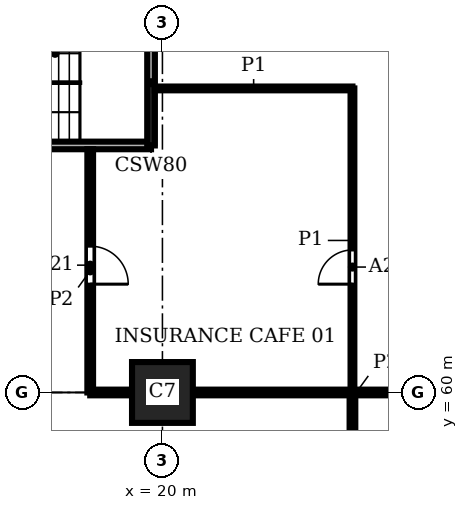
"""IFC4 building model, lengths in metres.
Left out: names, types, materials, properties, quantities, classifications, styles, units other than length and angle.
Written with IfcOpenShell. Run it as: python <this file> out.ifc"""

import sys

from ifc_helpers import new_model, si_unit, direction, frame, frame_2d, origin, origin_2d, place, context, subcontext, project, spatial, rectangle, extrude, element, fill, save


model = new_model("IFC4")
c1 = context("Model", 3, precision=1e-05, world=origin(), true_north=direction((0.0, 1.0)))
c2 = subcontext(c1, "Body", "Model", "MODEL_VIEW")
j1 = project(units=[si_unit("LENGTHUNIT", "METRE"), si_unit("PLANEANGLEUNIT", "RADIAN")], contexts=[c1])
p1 = place(None, origin())
s1 = spatial("IfcSite", under=j1, at=p1, CompositionType="ELEMENT")
p2 = place(p1, origin())
s2 = spatial("IfcBuilding", under=s1, at=p2, CompositionType="ELEMENT")
p3 = place(p2, frame((0.0, 0.0, 23.7)))
s3 = spatial("IfcBuildingStorey", under=s2, at=p3, CompositionType="ELEMENT", Elevation=23.7)
p4 = place(p3, frame((20.0, 60.0, 0.0), z_axis=(0.0, 0.0, 1.0), x_axis=(1.0, 0.0, 0.0)))
e1 = element("IfcColumn", 1, at=p4, inside=s3, PredefinedType="COLUMN", context=c2, shape_type="SweptSolid", body=[
    extrude(rectangle(XDim=1.6, YDim=1.6, at=origin_2d()), origin(), (0.0, 0.0, 1.0), 3.9),
])
p5 = place(p3, frame((13.1, 66.5, 0.0), z_axis=(0.0, 0.0, 1.0), x_axis=(1.0, 0.0, 0.0)))
e2 = element("IfcWall", 2, at=p5, inside=s3, PredefinedType="SHEAR", context=c2, shape_type="SweptSolid", body=[
    extrude(rectangle(XDim=6.6, YDim=0.2, at=frame_2d((3.3, 0.0))), origin(), (0.0, 0.0, 1.0), 3.58),
])
p6 = place(p5, frame((0.375, 0.0, 0.0)))
e3 = element("IfcOpeningElement", 3, at=p6, cuts=e2, PredefinedType="OPENING", context=c2, shape_type="SweptSolid", body=[
    extrude(rectangle(XDim=1.0, YDim=2.1, at=frame_2d((0.5, 1.05))), frame((0.0, 0.11, 0.0), z_axis=(0.0, -1.0, 0.0), x_axis=(1.0, 0.0, 0.0)), (0.0, 0.0, 1.0), 0.22),
])
p7 = place(p3, frame((19.7, 66.5, 0.0), z_axis=(0.0, 0.0, 1.0), x_axis=(0.0, 1.0, 0.0)))
e4 = element("IfcWall", 4, at=p7, inside=s3, PredefinedType="SHEAR", context=c2, shape_type="SweptSolid", body=[
    extrude(rectangle(XDim=3.3, YDim=0.2, at=frame_2d((1.65, 0.0))), origin(), (0.0, 0.0, 1.0), 3.58),
])
p8 = place(p3, frame((25.0, 60.0, 0.0), z_axis=(0.0, 0.0, 1.0), x_axis=(0.0, 1.0, 0.0)))
e5 = element("IfcWall", 5, at=p8, inside=s3, PredefinedType="PARTITIONING", context=c2, shape_type="SweptSolid", body=[
    extrude(rectangle(XDim=8.0, YDim=0.1, at=frame_2d((4.0, 0.0))), origin(), (0.0, 0.0, 1.0), 3.58),
])
p9 = place(p8, frame((2.85, 0.0, 0.0)))
e6 = element("IfcOpeningElement", 6, at=p9, cuts=e5, PredefinedType="OPENING", context=c2, shape_type="SweptSolid", body=[
    extrude(rectangle(XDim=0.9, YDim=2.1, at=frame_2d((0.45, 1.05))), frame((0.0, 0.06, 0.0), z_axis=(0.0, -1.0, 0.0), x_axis=(1.0, 0.0, 0.0)), (0.0, 0.0, 1.0), 0.12),
])
p10 = place(p3, frame((19.8, 68.0, 0.0), z_axis=(0.0, 0.0, 1.0), x_axis=(1.0, 0.0, 0.0)))
e7 = element("IfcWall", 7, at=p10, inside=s3, PredefinedType="PARTITIONING", context=c2, shape_type="SweptSolid", body=[
    extrude(rectangle(XDim=5.2, YDim=0.1, at=frame_2d((2.6, 0.0))), origin(), (0.0, 0.0, 1.0), 3.58),
])
p11 = place(p3, frame((18.1, 60.0, 0.0), z_axis=(0.0, 0.0, 1.0), x_axis=(0.0, 1.0, 0.0)))
e8 = element("IfcWall", 8, at=p11, inside=s3, PredefinedType="PARTITIONING", context=c2, shape_type="SweptSolid", body=[
    extrude(rectangle(XDim=6.4, YDim=0.15, at=frame_2d((3.2, 0.0))), origin(), (0.0, 0.0, 1.0), 3.58),
])
p12 = place(p11, frame((2.85, 0.0, 0.0)))
e9 = element("IfcOpeningElement", 9, at=p12, cuts=e8, PredefinedType="OPENING", context=c2, shape_type="SweptSolid", body=[
    extrude(rectangle(XDim=1.0, YDim=2.1, at=frame_2d((0.5, 1.05))), frame((0.0, 0.085, 0.0), z_axis=(0.0, -1.0, 0.0), x_axis=(1.0, 0.0, 0.0)), (0.0, 0.0, 1.0), 0.17),
])
p13 = place(p3, frame((25.0, 57.3, 0.0), z_axis=(0.0, 0.0, 1.0), x_axis=(0.0, 1.0, 0.0)))
e10 = element("IfcWall", 10, at=p13, inside=s3, PredefinedType="PARTITIONING", context=c2, shape_type="SweptSolid", body=[
    extrude(rectangle(XDim=2.7, YDim=0.15, at=frame_2d((1.35, 0.0))), origin(), (0.0, 0.0, 1.0), 3.58),
])
p14 = place(p3, frame((18.1, 60.0, 0.0), z_axis=(0.0, 0.0, 1.0), x_axis=(1.0, 0.0, 0.0)))
e11 = element("IfcWall", 11, at=p14, inside=s3, PredefinedType="PARTITIONING", context=c2, shape_type="SweptSolid", body=[
    extrude(rectangle(XDim=1.1, YDim=0.15, at=frame_2d((0.55, 0.0))), origin(), (0.0, 0.0, 1.0), 3.58),
])
p15 = place(p3, frame((20.8, 60.0, 0.0), z_axis=(0.0, 0.0, 1.0), x_axis=(1.0, 0.0, 0.0)))
e12 = element("IfcWall", 12, at=p15, inside=s3, PredefinedType="PARTITIONING", context=c2, shape_type="SweptSolid", body=[
    extrude(rectangle(XDim=8.6, YDim=0.15, at=frame_2d((4.3, 0.0))), origin(), (0.0, 0.0, 1.0), 3.58),
])
p16 = place(p12, frame((1.0, 0.0, 0.0), z_axis=(0.0, 0.0, 1.0), x_axis=(-1.0, 0.0, 0.0)))
e13 = element("IfcDoor", 13, at=p16, inside=s3, OperationType="SINGLE_SWING_RIGHT", PredefinedType="DOOR", context=c2, shape_type="SweptSolid", body=[
    extrude(rectangle(XDim=1.0, YDim=2.1, at=frame_2d((0.5, 1.05))), frame((0.0, 0.025, 0.0), z_axis=(0.0, -1.0, 0.0), x_axis=(1.0, 0.0, 0.0)), (0.0, 0.0, 1.0), 0.05),
])
fill(e9, e13)
p17 = place(p9, origin())
e14 = element("IfcDoor", 14, at=p17, inside=s3, OperationType="SINGLE_SWING_LEFT", PredefinedType="DOOR", context=c2, shape_type="SweptSolid", body=[
    extrude(rectangle(XDim=0.9, YDim=2.1, at=frame_2d((0.45, 1.05))), frame((0.0, 0.025, 0.0), z_axis=(0.0, -1.0, 0.0), x_axis=(1.0, 0.0, 0.0)), (0.0, 0.0, 1.0), 0.05),
])
fill(e6, e14)
save(model, sys.argv[1])
